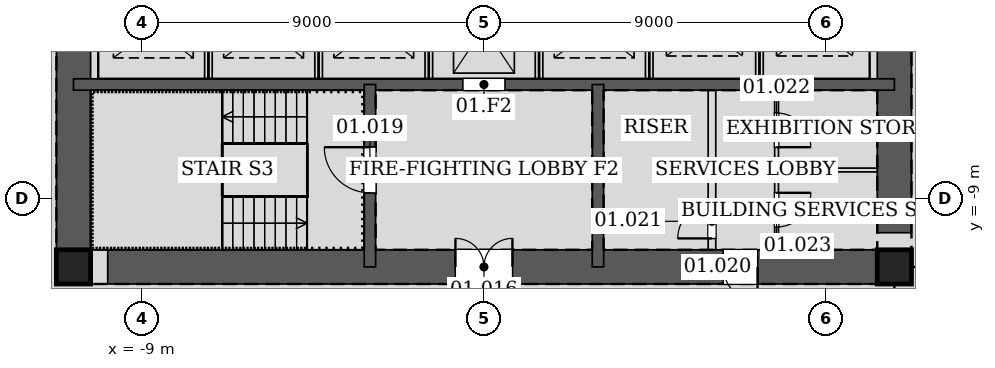
"""IFC4 building model, lengths in metres.
Left out: names, types, materials, properties, quantities, classifications, styles, units other than length and angle.
Written with IfcOpenShell. Run it as: python <this file> out.ifc"""

import sys

from ifc_helpers import new_model, si_unit, direction, frame, frame_2d, origin, origin_2d, place, context, subcontext, project, spatial, rectangle, hollow_rectangle, extrude, element, fill, save


model = new_model("IFC4")
c1 = context("Model", 3, precision=1e-05, world=origin(), true_north=direction((0.0, 1.0)))
c2 = subcontext(c1, "Body", "Model", "MODEL_VIEW")
j1 = project(units=[si_unit("LENGTHUNIT", "METRE"), si_unit("PLANEANGLEUNIT", "RADIAN")], contexts=[c1])
p1 = place(None, origin())
s1 = spatial("IfcSite", under=j1, at=p1, CompositionType="ELEMENT")
p2 = place(p1, origin())
s2 = spatial("IfcBuilding", under=s1, at=p2, CompositionType="ELEMENT")
p3 = place(p2, frame((0.0, 0.0, 7.2)))
s3 = spatial("IfcBuildingStorey", under=s2, at=p3, CompositionType="ELEMENT", Elevation=7.2)
for number, where, z_axis, x_axis in (
    (1, (-10.8, -10.8, 0.0), (0.0, 0.0, 1.0), (1.0, 0.0, 0.0)),
    (2, (10.8, -10.8, 0.0), (0.0, 0.0, 1.0), (1.0, 0.0, 0.0)),
):
    element("IfcColumn", number, at=place(p3, frame(where, z_axis=z_axis, x_axis=x_axis)), inside=s3, PredefinedType="COLUMN", context=c2, shape_type="SweptSolid", body=[
        extrude(hollow_rectangle(XDim=0.9, YDim=0.9, WallThickness=0.06, at=origin_2d()), origin(), (0.0, 0.0, 1.0), 6.0),
    ])
p4 = place(p3, frame((-10.8, -10.8, 0.0), z_axis=(0.0, 0.0, 1.0), x_axis=(1.0, 0.0, 0.0)))
e3 = element("IfcWall", 3, at=p4, inside=s3, PredefinedType="SOLIDWALL", context=c2, shape_type="SweptSolid", body=[
    extrude(rectangle(XDim=21.6, YDim=0.9, at=frame_2d((10.8, 0.0))), origin(), (0.0, 0.0, 1.0), 6.0),
])
p5 = place(p4, frame((10.05, 0.0, 0.0)))
e4 = element("IfcOpeningElement", 4, at=p5, cuts=e3, PredefinedType="OPENING", context=c2, shape_type="SweptSolid", body=[
    extrude(rectangle(XDim=1.5, YDim=2.1, at=frame_2d((0.75, 1.05))), frame((0.0, 0.46, 0.0), z_axis=(0.0, -1.0, 0.0), x_axis=(1.0, 0.0, 0.0)), (0.0, 0.0, 1.0), 0.92),
])
p6 = place(p4, frame((17.1, 0.0, 0.0)))
e5 = element("IfcOpeningElement", 5, at=p6, cuts=e3, PredefinedType="OPENING", context=c2, shape_type="SweptSolid", body=[
    extrude(rectangle(XDim=0.9, YDim=2.1, at=frame_2d((0.45, 1.05))), frame((0.0, 0.46, 0.0), z_axis=(0.0, -1.0, 0.0), x_axis=(1.0, 0.0, 0.0)), (0.0, 0.0, 1.0), 0.92),
])
p7 = place(p3, frame((10.8, -10.8, 0.0), z_axis=(0.0, 0.0, 1.0), x_axis=(0.0, 1.0, 0.0)))
e6 = element("IfcWall", 6, at=p7, inside=s3, PredefinedType="SOLIDWALL", context=c2, shape_type="SweptSolid", body=[
    extrude(rectangle(XDim=21.6, YDim=0.9, at=frame_2d((10.8, 0.0))), origin(), (0.0, 0.0, 1.0), 6.0),
])
p8 = place(p7, frame((11.7, 0.0, 0.0)))
e7 = element("IfcOpeningElement", 7, at=p8, cuts=e6, PredefinedType="OPENING", context=c2, shape_type="SweptSolid", body=[
    extrude(rectangle(XDim=1.2, YDim=2.1, at=frame_2d((0.6, 1.05))), frame((0.0, 0.46, 0.0), z_axis=(0.0, -1.0, 0.0), x_axis=(1.0, 0.0, 0.0)), (0.0, 0.0, 1.0), 0.92),
])
p9 = place(p7, frame((8.7, 0.0, 0.0)))
e8 = element("IfcOpeningElement", 8, at=p9, cuts=e6, PredefinedType="OPENING", context=c2, shape_type="SweptSolid", body=[
    extrude(rectangle(XDim=1.2, YDim=2.1, at=frame_2d((0.6, 1.05))), frame((0.0, 0.46, 0.0), z_axis=(0.0, -1.0, 0.0), x_axis=(1.0, 0.0, 0.0)), (0.0, 0.0, 1.0), 0.92),
])
p10 = place(p3, frame((-10.8, 10.8, 0.0), z_axis=(0.0, 0.0, 1.0), x_axis=(0.0, -1.0, 0.0)))
e9 = element("IfcWall", 9, at=p10, inside=s3, PredefinedType="SOLIDWALL", context=c2, shape_type="SweptSolid", body=[
    extrude(rectangle(XDim=21.6, YDim=0.9, at=frame_2d((10.8, 0.0))), origin(), (0.0, 0.0, 1.0), 6.0),
])
p11 = place(p10, frame((8.7, 0.0, 0.0)))
e10 = element("IfcOpeningElement", 10, at=p11, cuts=e9, PredefinedType="OPENING", context=c2, shape_type="SweptSolid", body=[
    extrude(rectangle(XDim=1.2, YDim=2.1, at=frame_2d((0.6, 1.05))), frame((0.0, 0.46, 0.0), z_axis=(0.0, -1.0, 0.0), x_axis=(1.0, 0.0, 0.0)), (0.0, 0.0, 1.0), 0.92),
])
p12 = place(p10, frame((11.7, 0.0, 0.0)))
e11 = element("IfcOpeningElement", 11, at=p12, cuts=e9, PredefinedType="OPENING", context=c2, shape_type="SweptSolid", body=[
    extrude(rectangle(XDim=1.2, YDim=2.1, at=frame_2d((0.6, 1.05))), frame((0.0, 0.46, 0.0), z_axis=(0.0, -1.0, 0.0), x_axis=(1.0, 0.0, 0.0)), (0.0, 0.0, 1.0), 0.92),
])
p13 = place(p3, frame((-10.8, -6.0, 0.0), z_axis=(0.0, 0.0, 1.0), x_axis=(1.0, 0.0, 0.0)))
e12 = element("IfcWall", 12, at=p13, inside=s3, PredefinedType="SOLIDWALL", context=c2, shape_type="SweptSolid", body=[
    extrude(rectangle(XDim=21.6, YDim=0.3, at=frame_2d((10.8, 0.0))), origin(), (0.0, 0.0, 1.0), 6.0),
])
p14 = place(p13, frame((10.25, 0.0, 0.0)))
e13 = element("IfcOpeningElement", 13, at=p14, cuts=e12, PredefinedType="OPENING", context=c2, shape_type="SweptSolid", body=[
    extrude(rectangle(XDim=1.1, YDim=2.1, at=frame_2d((0.55, 1.05))), frame((0.0, 0.16, 0.0), z_axis=(0.0, -1.0, 0.0), x_axis=(1.0, 0.0, 0.0)), (0.0, 0.0, 1.0), 0.32),
])
p15 = place(p3, frame((-3.0, -6.0, 0.0), z_axis=(0.0, 0.0, 1.0), x_axis=(0.0, -1.0, 0.0)))
e14 = element("IfcWall", 14, at=p15, inside=s3, PredefinedType="SOLIDWALL", context=c2, shape_type="SweptSolid", body=[
    extrude(rectangle(XDim=4.8, YDim=0.3, at=frame_2d((2.4, 0.0))), origin(), (0.0, 0.0, 1.0), 6.0),
])
p16 = place(p15, frame((1.65, 0.0, 0.0)))
e15 = element("IfcOpeningElement", 15, at=p16, cuts=e14, PredefinedType="OPENING", context=c2, shape_type="SweptSolid", body=[
    extrude(rectangle(XDim=1.2, YDim=2.1, at=frame_2d((0.6, 1.05))), frame((0.0, 0.16, 0.0), z_axis=(0.0, -1.0, 0.0), x_axis=(1.0, 0.0, 0.0)), (0.0, 0.0, 1.0), 0.32),
])
p17 = place(p3, frame((3.0, -6.0, 0.0), z_axis=(0.0, 0.0, 1.0), x_axis=(0.0, -1.0, 0.0)))
e16 = element("IfcWall", 16, at=p17, inside=s3, PredefinedType="SOLIDWALL", context=c2, shape_type="SweptSolid", body=[
    extrude(rectangle(XDim=4.8, YDim=0.3, at=frame_2d((2.4, 0.0))), origin(), (0.0, 0.0, 1.0), 6.0),
])
for number, where, z_axis, x_axis in (
    (17, (-7.25, -5.85, 0.0), (0.0, 0.0, 1.0), (0.0, 1.0, 0.0)),
    (18, (-4.35, -5.85, 0.0), (0.0, 0.0, 1.0), (0.0, 1.0, 0.0)),
    (19, (-1.45, -5.85, 0.0), (0.0, 0.0, 1.0), (0.0, 1.0, 0.0)),
    (20, (1.45, -5.85, 0.0), (0.0, 0.0, 1.0), (0.0, 1.0, 0.0)),
    (21, (4.35, -5.85, 0.0), (0.0, 0.0, 1.0), (0.0, 1.0, 0.0)),
    (22, (7.25, -5.85, 0.0), (0.0, 0.0, 1.0), (0.0, 1.0, 0.0)),
):
    element("IfcWall", number, at=place(p3, frame(where, z_axis=z_axis, x_axis=x_axis)), inside=s3, PredefinedType="PARTITIONING", context=c2, shape_type="SweptSolid", body=[
        extrude(rectangle(XDim=2.7, YDim=0.2, at=frame_2d((1.35, 0.0))), origin(), (0.0, 0.0, 1.0), 6.0),
    ])
p18 = place(p3, frame((6.0, -10.35, 0.0), z_axis=(0.0, 0.0, 1.0), x_axis=(0.0, 1.0, 0.0)))
e23 = element("IfcWall", 23, at=p18, inside=s3, PredefinedType="PARTITIONING", context=c2, shape_type="SweptSolid", body=[
    extrude(rectangle(XDim=4.2, YDim=0.2, at=frame_2d((2.1, 0.0))), origin(), (0.0, 0.0, 1.0), 5.7),
])
p19 = place(p18, frame((0.3, 0.0, 0.0)))
e24 = element("IfcOpeningElement", 24, at=p19, cuts=e23, PredefinedType="OPENING", context=c2, shape_type="SweptSolid", body=[
    extrude(rectangle(XDim=0.9, YDim=2.1, at=frame_2d((0.45, 1.05))), frame((0.0, 0.11, 0.0), z_axis=(0.0, -1.0, 0.0), x_axis=(1.0, 0.0, 0.0)), (0.0, 0.0, 1.0), 0.22),
])
p20 = place(p3, frame((7.7, -10.35, 0.0), z_axis=(0.0, 0.0, 1.0), x_axis=(0.0, 1.0, 0.0)))
e25 = element("IfcWall", 25, at=p20, inside=s3, PredefinedType="PARTITIONING", context=c2, shape_type="SweptSolid", body=[
    extrude(rectangle(XDim=4.2, YDim=0.1, at=frame_2d((2.1, 0.0))), origin(), (0.0, 0.0, 1.0), 5.7),
])
p21 = place(p20, frame((2.7, 0.0, 0.0)))
e26 = element("IfcOpeningElement", 26, at=p21, cuts=e25, PredefinedType="OPENING", context=c2, shape_type="SweptSolid", body=[
    extrude(rectangle(XDim=0.9, YDim=2.1, at=frame_2d((0.45, 1.05))), frame((0.0, 0.06, 0.0), z_axis=(0.0, -1.0, 0.0), x_axis=(1.0, 0.0, 0.0)), (0.0, 0.0, 1.0), 0.12),
])
p22 = place(p20, frame((0.6, 0.0, 0.0)))
e27 = element("IfcOpeningElement", 27, at=p22, cuts=e25, PredefinedType="OPENING", context=c2, shape_type="SweptSolid", body=[
    extrude(rectangle(XDim=0.9, YDim=2.1, at=frame_2d((0.45, 1.05))), frame((0.0, 0.06, 0.0), z_axis=(0.0, -1.0, 0.0), x_axis=(1.0, 0.0, 0.0)), (0.0, 0.0, 1.0), 0.12),
])
p23 = place(p3, frame((7.7, -8.25, 0.0), z_axis=(0.0, 0.0, 1.0), x_axis=(1.0, 0.0, 0.0)))
e28 = element("IfcWall", 28, at=p23, inside=s3, PredefinedType="PARTITIONING", context=c2, shape_type="SweptSolid", body=[
    extrude(rectangle(XDim=2.65, YDim=0.1, at=frame_2d((1.325, 0.0))), origin(), (0.0, 0.0, 1.0), 5.7),
])
p24 = place(p5, origin())
e29 = element("IfcDoor", 29, at=p24, inside=s3, OperationType="DOUBLE_DOOR_SINGLE_SWING", PredefinedType="DOOR", context=c2, shape_type="SweptSolid", body=[
    extrude(rectangle(XDim=1.5, YDim=2.1, at=frame_2d((0.75, 1.05))), frame((0.0, 0.025, 0.0), z_axis=(0.0, -1.0, 0.0), x_axis=(1.0, 0.0, 0.0)), (0.0, 0.0, 1.0), 0.05),
])
fill(e4, e29)
p25 = place(p16, frame((1.2, 0.0, 0.0), z_axis=(0.0, 0.0, 1.0), x_axis=(-1.0, 0.0, 0.0)))
e30 = element("IfcDoor", 30, at=p25, inside=s3, OperationType="SINGLE_SWING_RIGHT", PredefinedType="DOOR", context=c2, shape_type="SweptSolid", body=[
    extrude(rectangle(XDim=1.2, YDim=2.1, at=frame_2d((0.6, 1.05))), frame((0.0, 0.025, 0.0), z_axis=(0.0, -1.0, 0.0), x_axis=(1.0, 0.0, 0.0)), (0.0, 0.0, 1.0), 0.05),
])
fill(e15, e30)
p26 = place(p6, frame((0.9, 0.0, 0.0), z_axis=(0.0, 0.0, 1.0), x_axis=(-1.0, 0.0, 0.0)))
e31 = element("IfcDoor", 31, at=p26, inside=s3, OperationType="SINGLE_SWING_LEFT", PredefinedType="DOOR", context=c2, shape_type="SweptSolid", body=[
    extrude(rectangle(XDim=0.9, YDim=2.1, at=frame_2d((0.45, 1.05))), frame((0.0, 0.025, 0.0), z_axis=(0.0, -1.0, 0.0), x_axis=(1.0, 0.0, 0.0)), (0.0, 0.0, 1.0), 0.05),
])
fill(e5, e31)
p27 = place(p19, origin())
e32 = element("IfcDoor", 32, at=p27, inside=s3, OperationType="SINGLE_SWING_LEFT", PredefinedType="DOOR", context=c2, shape_type="SweptSolid", body=[
    extrude(rectangle(XDim=0.9, YDim=2.1, at=frame_2d((0.45, 1.05))), frame((0.0, 0.025, 0.0), z_axis=(0.0, -1.0, 0.0), x_axis=(1.0, 0.0, 0.0)), (0.0, 0.0, 1.0), 0.05),
])
fill(e24, e32)
p28 = place(p21, frame((0.9, 0.0, 0.0), z_axis=(0.0, 0.0, 1.0), x_axis=(-1.0, 0.0, 0.0)))
e33 = element("IfcDoor", 33, at=p28, inside=s3, OperationType="SINGLE_SWING_RIGHT", PredefinedType="DOOR", context=c2, shape_type="SweptSolid", body=[
    extrude(rectangle(XDim=0.9, YDim=2.1, at=frame_2d((0.45, 1.05))), frame((0.0, 0.025, 0.0), z_axis=(0.0, -1.0, 0.0), x_axis=(1.0, 0.0, 0.0)), (0.0, 0.0, 1.0), 0.05),
])
fill(e26, e33)
p29 = place(p22, frame((0.9, 0.0, 0.0), z_axis=(0.0, 0.0, 1.0), x_axis=(-1.0, 0.0, 0.0)))
e34 = element("IfcDoor", 34, at=p29, inside=s3, OperationType="SINGLE_SWING_LEFT", PredefinedType="DOOR", context=c2, shape_type="SweptSolid", body=[
    extrude(rectangle(XDim=0.9, YDim=2.1, at=frame_2d((0.45, 1.05))), frame((0.0, 0.025, 0.0), z_axis=(0.0, -1.0, 0.0), x_axis=(1.0, 0.0, 0.0)), (0.0, 0.0, 1.0), 0.05),
])
fill(e27, e34)
p30 = place(p14, origin())
e35 = element("IfcDoor", 35, at=p30, inside=s3, OperationType="DOUBLE_DOOR_SLIDING", PredefinedType="DOOR", context=c2, shape_type="SweptSolid", body=[
    extrude(rectangle(XDim=1.1, YDim=2.1, at=frame_2d((0.55, 1.05))), frame((0.0, 0.025, 0.0), z_axis=(0.0, -1.0, 0.0), x_axis=(1.0, 0.0, 0.0)), (0.0, 0.0, 1.0), 0.05),
])
fill(e13, e35)
save(model, sys.argv[1])
